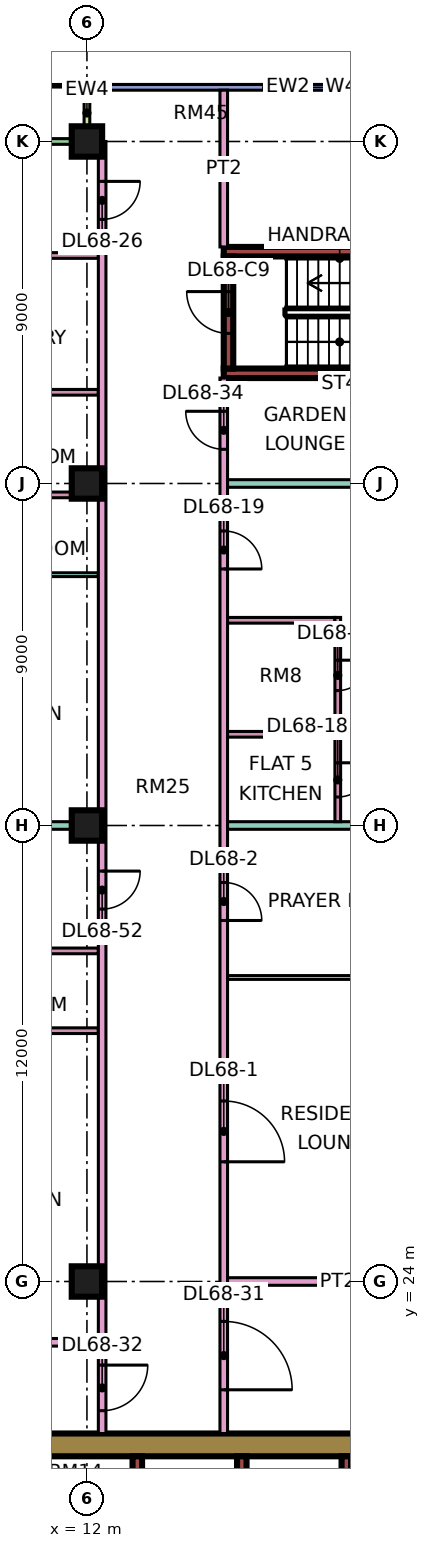
"""IFC4 building model, lengths in metres.
Left out: names, types, materials, properties, quantities, classifications, styles, units other than length and angle.
Written with IfcOpenShell. Run it as: python <this file> out.ifc"""

import sys

from ifc_helpers import new_model, si_unit, direction, frame, frame_2d, origin, origin_2d, place, context, subcontext, project, spatial, rectangle, extrude, element, fill, save


model = new_model("IFC4")
c1 = context("Model", 3, precision=1e-05, world=origin(), true_north=direction((0.0, 1.0)))
c2 = subcontext(c1, "Body", "Model", "MODEL_VIEW")
j1 = project(units=[si_unit("LENGTHUNIT", "METRE"), si_unit("PLANEANGLEUNIT", "RADIAN")], contexts=[c1])
p1 = place(None, origin())
s1 = spatial("IfcSite", under=j1, at=p1, CompositionType="ELEMENT")
p2 = place(p1, origin())
s2 = spatial("IfcBuilding", under=s1, at=p2, CompositionType="ELEMENT")
p3 = place(p2, frame((0.0, 0.0, 292.15)))
s3 = spatial("IfcBuildingStorey", under=s2, at=p3, CompositionType="ELEMENT", Elevation=292.15)
for number, where, z_axis, x_axis in (
    (1, (12.0, 24.0, 0.0), (0.0, 0.0, 1.0), (1.0, 0.0, 0.0)),
    (2, (12.0, 36.0, 0.0), (0.0, 0.0, 1.0), (1.0, 0.0, 0.0)),
    (3, (12.0, 45.0, 0.0), (0.0, 0.0, 1.0), (1.0, 0.0, 0.0)),
    (4, (12.0, 54.0, 0.0), (0.0, 0.0, 1.0), (1.0, 0.0, 0.0)),
):
    element("IfcColumn", number, at=place(p3, frame(where, z_axis=z_axis, x_axis=x_axis)), inside=s3, PredefinedType="COLUMN", context=c2, shape_type="SweptSolid", body=[
        extrude(rectangle(XDim=0.8, YDim=0.8, at=origin_2d()), origin(), (0.0, 0.0, 1.0), 3.75),
    ])
p4 = place(p3, frame((9.0, 19.7, 0.0), z_axis=(0.0, 0.0, 1.0), x_axis=(1.0, 0.0, 0.0)))
e5 = element("IfcWall", 5, at=p4, inside=s3, PredefinedType="SHEAR", context=c2, shape_type="SweptSolid", body=[
    extrude(rectangle(XDim=25.0, YDim=0.6, at=frame_2d((12.5, 0.0))), origin(), (0.0, 0.0, 1.0), 3.75),
])
p5 = place(p4, frame((19.1, 0.0, 0.0)))
e6 = element("IfcOpeningElement", 6, at=p5, cuts=e5, PredefinedType="OPENING", context=c2, shape_type="SweptSolid", body=[
    extrude(rectangle(XDim=1.8, YDim=2.4, at=frame_2d((0.9, 1.2))), frame((0.0, 0.31, 0.0), z_axis=(0.0, -1.0, 0.0), x_axis=(1.0, 0.0, 0.0)), (0.0, 0.0, 1.0), 0.62),
])
p6 = place(p3, frame((13.325, 7.6, 0.0), z_axis=(0.0, 0.0, 1.0), x_axis=(0.0, 1.0, 0.0)))
e7 = element("IfcWall", 7, at=p6, inside=s3, PredefinedType="SHEAR", context=c2, shape_type="SweptSolid", body=[
    extrude(rectangle(XDim=11.8, YDim=0.25, at=frame_2d((5.9, 0.0))), origin(), (0.0, 0.0, 1.0), 3.75),
])
for number, where, z_axis, x_axis in (
    (8, (16.075, 15.8, 0.0), (0.0, 0.0, 1.0), (0.0, 1.0, 0.0)),
    (9, (18.825, 15.8, 0.0), (0.0, 0.0, 1.0), (0.0, 1.0, 0.0)),
):
    element("IfcWall", number, at=place(p3, frame(where, z_axis=z_axis, x_axis=x_axis)), inside=s3, PredefinedType="SHEAR", context=c2, shape_type="SweptSolid", body=[
        extrude(rectangle(XDim=3.6, YDim=0.25, at=frame_2d((1.8, 0.0))), origin(), (0.0, 0.0, 1.0), 3.75),
    ])
for number, where, z_axis, x_axis in (
    (10, (15.6, 47.9, 0.0), (0.0, 0.0, 1.0), (1.0, 0.0, 0.0)),
    (11, (15.6, 51.1, 0.0), (0.0, 0.0, 1.0), (1.0, 0.0, 0.0)),
):
    element("IfcWall", number, at=place(p3, frame(where, z_axis=z_axis, x_axis=x_axis)), inside=s3, PredefinedType="SHEAR", context=c2, shape_type="SweptSolid", body=[
        extrude(rectangle(XDim=7.0, YDim=0.25, at=frame_2d((3.5, 0.0))), origin(), (0.0, 0.0, 1.0), 3.75),
    ])
p7 = place(p3, frame((15.725, 48.025, 0.0), z_axis=(0.0, 0.0, 1.0), x_axis=(0.0, 1.0, 0.0)))
e12 = element("IfcWall", 12, at=p7, inside=s3, PredefinedType="SHEAR", context=c2, shape_type="SweptSolid", body=[
    extrude(rectangle(XDim=2.95, YDim=0.25, at=frame_2d((1.475, 0.0))), origin(), (0.0, 0.0, 1.0), 3.75),
])
p8 = place(p7, frame((0.925, 0.0, 0.0)))
e13 = element("IfcOpeningElement", 13, at=p8, cuts=e12, PredefinedType="OPENING", context=c2, shape_type="SweptSolid", body=[
    extrude(rectangle(XDim=1.1, YDim=2.2, at=frame_2d((0.55, 1.1))), frame((0.0, 0.135, 0.0), z_axis=(0.0, -1.0, 0.0), x_axis=(1.0, 0.0, 0.0)), (0.0, 0.0, 1.0), 0.27),
])
p9 = place(p3, frame((22.5, 55.425, 0.0), z_axis=(0.0, 0.0, 1.0), x_axis=(-1.0, 0.0, 0.0)))
e14 = element("IfcWall", 14, at=p9, inside=s3, PredefinedType="SOLIDWALL", context=c2, shape_type="SweptSolid", body=[
    extrude(rectangle(XDim=10.425, YDim=0.15, at=frame_2d((5.212, 0.0))), origin(), (0.0, 0.0, 1.0), 3.35),
])
p10 = place(p9, frame((1.05, 0.0, 0.45)))
e15 = element("IfcOpeningElement", 15, at=p10, cuts=e14, PredefinedType="OPENING", context=c2, shape_type="SweptSolid", body=[
    extrude(rectangle(XDim=4.8, YDim=2.4, at=frame_2d((2.4, 1.2))), frame((0.0, 0.085, 0.0), z_axis=(0.0, -1.0, 0.0), x_axis=(1.0, 0.0, 0.0)), (0.0, 0.0, 1.0), 0.17),
])
p11 = place(p3, frame((11.925, 54.0, 0.0), z_axis=(0.0, 0.0, 1.0), x_axis=(-1.0, 0.0, 0.0)))
e16 = element("IfcWall", 16, at=p11, inside=s3, PredefinedType="SOLIDWALL", context=c2, shape_type="SweptSolid", body=[
    extrude(rectangle(XDim=10.35, YDim=0.15, at=frame_2d((5.175, 0.0))), origin(), (0.0, 0.0, 1.0), 3.35),
])
p12 = place(p11, frame((4.488, 0.0, 0.0)))
e17 = element("IfcOpeningElement", 17, at=p12, cuts=e16, PredefinedType="OPENING", context=c2, shape_type="SweptSolid", body=[
    extrude(rectangle(XDim=1.8, YDim=2.4, at=frame_2d((0.9, 1.2))), frame((0.0, 0.085, 0.0), z_axis=(0.0, -1.0, 0.0), x_axis=(1.0, 0.0, 0.0)), (0.0, 0.0, 1.0), 0.17),
])
p13 = place(p3, frame((12.0, 55.5, 0.0), z_axis=(0.0, 0.0, 1.0), x_axis=(0.0, -1.0, 0.0)))
e18 = element("IfcWall", 18, at=p13, inside=s3, PredefinedType="SOLIDWALL", context=c2, shape_type="SweptSolid", body=[
    extrude(rectangle(XDim=1.5, YDim=0.15, at=frame_2d((0.75, 0.0))), origin(), (0.0, 0.0, 1.0), 3.35),
])
p14 = place(p3, frame((-1.35, 22.4, 0.0), z_axis=(0.0, 0.0, 1.0), x_axis=(1.0, 0.0, 0.0)))
e19 = element("IfcWall", 19, at=p14, inside=s3, PredefinedType="PARTITIONING", context=c2, shape_type="SweptSolid", body=[
    extrude(rectangle(XDim=13.65, YDim=0.2, at=frame_2d((6.825, 0.0))), origin(), (0.0, 0.0, 1.0), 3.35),
])
p15 = place(p3, frame((0.0, 36.0, 0.0), z_axis=(0.0, 0.0, 1.0), x_axis=(1.0, 0.0, 0.0)))
e20 = element("IfcWall", 20, at=p15, inside=s3, PredefinedType="PARTITIONING", context=c2, shape_type="SweptSolid", body=[
    extrude(rectangle(XDim=12.3, YDim=0.2, at=frame_2d((6.15, 0.0))), origin(), (0.0, 0.0, 1.0), 3.35),
])
for number, where, z_axis, x_axis in (
    (21, (7.675, 30.6, 0.0), (0.0, 0.0, 1.0), (1.0, 0.0, 0.0)),
    (22, (7.675, 32.7, 0.0), (0.0, 0.0, 1.0), (1.0, 0.0, 0.0)),
):
    element("IfcWall", number, at=place(p3, frame(where, z_axis=z_axis, x_axis=x_axis)), inside=s3, PredefinedType="PARTITIONING", context=c2, shape_type="SweptSolid", body=[
        extrude(rectangle(XDim=4.625, YDim=0.15, at=frame_2d((2.312, 0.0))), origin(), (0.0, 0.0, 1.0), 3.35),
    ])
p16 = place(p3, frame((7.675, 42.6, 0.0), z_axis=(0.0, 0.0, 1.0), x_axis=(1.0, 0.0, 0.0)))
e23 = element("IfcWall", 23, at=p16, inside=s3, PredefinedType="PARTITIONING", context=c2, shape_type="SweptSolid", body=[
    extrude(rectangle(XDim=4.625, YDim=0.1, at=frame_2d((2.312, 0.0))), origin(), (0.0, 0.0, 1.0), 3.35),
])
for number, where, z_axis, x_axis in (
    (24, (7.675, 44.7, 0.0), (0.0, 0.0, 1.0), (1.0, 0.0, 0.0)),
    (25, (7.675, 47.4, 0.0), (0.0, 0.0, 1.0), (1.0, 0.0, 0.0)),
):
    element("IfcWall", number, at=place(p3, frame(where, z_axis=z_axis, x_axis=x_axis)), inside=s3, PredefinedType="PARTITIONING", context=c2, shape_type="SweptSolid", body=[
        extrude(rectangle(XDim=4.625, YDim=0.15, at=frame_2d((2.312, 0.0))), origin(), (0.0, 0.0, 1.0), 3.35),
    ])
p17 = place(p3, frame((7.675, 51.0, 0.0), z_axis=(0.0, 0.0, 1.0), x_axis=(1.0, 0.0, 0.0)))
e26 = element("IfcWall", 26, at=p17, inside=s3, PredefinedType="PARTITIONING", context=c2, shape_type="SweptSolid", body=[
    extrude(rectangle(XDim=4.625, YDim=0.15, at=frame_2d((2.312, 0.0))), origin(), (0.0, 0.0, 1.0), 3.35),
])
p18 = place(p17, frame((1.875, 0.0, 0.0)))
e27 = element("IfcOpeningElement", 27, at=p18, cuts=e26, PredefinedType="OPENING", context=c2, shape_type="SweptSolid", body=[
    extrude(rectangle(XDim=0.8, YDim=2.1, at=frame_2d((0.4, 1.05))), frame((0.0, 0.085, 0.0), z_axis=(0.0, -1.0, 0.0), x_axis=(1.0, 0.0, 0.0)), (0.0, 0.0, 1.0), 0.17),
])
p19 = place(p3, frame((12.4, 20.0, 0.0), z_axis=(0.0, 0.0, 1.0), x_axis=(0.0, 1.0, 0.0)))
e28 = element("IfcWall", 28, at=p19, inside=s3, PredefinedType="PARTITIONING", context=c2, shape_type="SweptSolid", body=[
    extrude(rectangle(XDim=34.0, YDim=0.2, at=frame_2d((17.0, 0.0))), origin(), (0.0, 0.0, 1.0), 3.35),
])
p20 = place(p19, frame((31.95, 0.0, 0.0)))
e29 = element("IfcOpeningElement", 29, at=p20, cuts=e28, PredefinedType="OPENING", context=c2, shape_type="SweptSolid", body=[
    extrude(rectangle(XDim=1.0, YDim=2.1, at=frame_2d((0.5, 1.05))), frame((0.0, 0.11, 0.0), z_axis=(0.0, -1.0, 0.0), x_axis=(1.0, 0.0, 0.0)), (0.0, 0.0, 1.0), 0.22),
])
p21 = place(p19, frame((0.6, 0.0, 0.0)))
e30 = element("IfcOpeningElement", 30, at=p21, cuts=e28, PredefinedType="OPENING", context=c2, shape_type="SweptSolid", body=[
    extrude(rectangle(XDim=1.2, YDim=2.1, at=frame_2d((0.6, 1.05))), frame((0.0, 0.11, 0.0), z_axis=(0.0, -1.0, 0.0), x_axis=(1.0, 0.0, 0.0)), (0.0, 0.0, 1.0), 0.22),
])
p22 = place(p19, frame((13.8, 0.0, 0.0)))
e31 = element("IfcOpeningElement", 31, at=p22, cuts=e28, PredefinedType="OPENING", context=c2, shape_type="SweptSolid", body=[
    extrude(rectangle(XDim=1.0, YDim=2.1, at=frame_2d((0.5, 1.05))), frame((0.0, 0.11, 0.0), z_axis=(0.0, -1.0, 0.0), x_axis=(1.0, 0.0, 0.0)), (0.0, 0.0, 1.0), 0.22),
])
p23 = place(p3, frame((15.6, 20.0, 0.0), z_axis=(0.0, 0.0, 1.0), x_axis=(0.0, 1.0, 0.0)))
e32 = element("IfcWall", 32, at=p23, inside=s3, PredefinedType="PARTITIONING", context=c2, shape_type="SweptSolid", body=[
    extrude(rectangle(XDim=27.775, YDim=0.2, at=frame_2d((13.887, 0.0))), origin(), (0.0, 0.0, 1.0), 3.35),
])
p24 = place(p23, frame((7.15, 0.0, 0.0)))
e33 = element("IfcOpeningElement", 33, at=p24, cuts=e32, PredefinedType="OPENING", context=c2, shape_type="SweptSolid", body=[
    extrude(rectangle(XDim=1.6, YDim=2.1, at=frame_2d((0.8, 1.05))), frame((0.0, 0.11, 0.0), z_axis=(0.0, -1.0, 0.0), x_axis=(1.0, 0.0, 0.0)), (0.0, 0.0, 1.0), 0.22),
])
p25 = place(p23, frame((13.5, 0.0, 0.0)))
e34 = element("IfcOpeningElement", 34, at=p25, cuts=e32, PredefinedType="OPENING", context=c2, shape_type="SweptSolid", body=[
    extrude(rectangle(XDim=1.0, YDim=2.1, at=frame_2d((0.5, 1.05))), frame((0.0, 0.11, 0.0), z_axis=(0.0, -1.0, 0.0), x_axis=(1.0, 0.0, 0.0)), (0.0, 0.0, 1.0), 0.22),
])
p26 = place(p23, frame((22.75, 0.0, 0.0)))
e35 = element("IfcOpeningElement", 35, at=p26, cuts=e32, PredefinedType="OPENING", context=c2, shape_type="SweptSolid", body=[
    extrude(rectangle(XDim=1.0, YDim=2.1, at=frame_2d((0.5, 1.05))), frame((0.0, 0.11, 0.0), z_axis=(0.0, -1.0, 0.0), x_axis=(1.0, 0.0, 0.0)), (0.0, 0.0, 1.0), 0.22),
])
p27 = place(p23, frame((1.15, 0.0, 0.0)))
e36 = element("IfcOpeningElement", 36, at=p27, cuts=e32, PredefinedType="OPENING", context=c2, shape_type="SweptSolid", body=[
    extrude(rectangle(XDim=1.8, YDim=2.1, at=frame_2d((0.9, 1.05))), frame((0.0, 0.11, 0.0), z_axis=(0.0, -1.0, 0.0), x_axis=(1.0, 0.0, 0.0)), (0.0, 0.0, 1.0), 0.22),
])
p28 = place(p23, frame((25.9, 0.0, 0.0)))
e37 = element("IfcOpeningElement", 37, at=p28, cuts=e32, PredefinedType="OPENING", context=c2, shape_type="SweptSolid", body=[
    extrude(rectangle(XDim=1.0, YDim=2.1, at=frame_2d((0.5, 1.05))), frame((0.0, 0.11, 0.0), z_axis=(0.0, -1.0, 0.0), x_axis=(1.0, 0.0, 0.0)), (0.0, 0.0, 1.0), 0.22),
])
p29 = place(p3, frame((15.6, 51.225, 0.0), z_axis=(0.0, 0.0, 1.0), x_axis=(0.0, 1.0, 0.0)))
e38 = element("IfcWall", 38, at=p29, inside=s3, PredefinedType="PARTITIONING", context=c2, shape_type="SweptSolid", body=[
    extrude(rectangle(XDim=4.125, YDim=0.2, at=frame_2d((2.062, 0.0))), origin(), (0.0, 0.0, 1.0), 3.35),
])
p30 = place(p3, frame((15.7, 24.0, 0.0), z_axis=(0.0, 0.0, 1.0), x_axis=(1.0, 0.0, 0.0)))
e39 = element("IfcWall", 39, at=p30, inside=s3, PredefinedType="PARTITIONING", context=c2, shape_type="SweptSolid", body=[
    extrude(rectangle(XDim=5.8, YDim=0.2, at=frame_2d((2.9, 0.0))), origin(), (0.0, 0.0, 1.0), 3.35),
])
p31 = place(p3, frame((15.7, 32.0, 0.0), z_axis=(0.0, 0.0, 1.0), x_axis=(1.0, 0.0, 0.0)))
e40 = element("IfcWall", 40, at=p31, inside=s3, PredefinedType="PARTITIONING", context=c2, shape_type="SweptSolid", body=[
    extrude(rectangle(XDim=5.8, YDim=0.1, at=frame_2d((2.9, 0.0))), origin(), (0.0, 0.0, 1.0), 3.35),
])
p32 = place(p3, frame((15.7, 36.0, 0.0), z_axis=(0.0, 0.0, 1.0), x_axis=(1.0, 0.0, 0.0)))
e41 = element("IfcWall", 41, at=p32, inside=s3, PredefinedType="PARTITIONING", context=c2, shape_type="SweptSolid", body=[
    extrude(rectangle(XDim=8.3, YDim=0.2, at=frame_2d((4.15, 0.0))), origin(), (0.0, 0.0, 1.0), 3.35),
])
for number, where, z_axis, x_axis in (
    (42, (15.7, 38.4, 0.0), (0.0, 0.0, 1.0), (1.0, 0.0, 0.0)),
    (43, (15.7, 41.4, 0.0), (0.0, 0.0, 1.0), (1.0, 0.0, 0.0)),
):
    element("IfcWall", number, at=place(p3, frame(where, z_axis=z_axis, x_axis=x_axis)), inside=s3, PredefinedType="PARTITIONING", context=c2, shape_type="SweptSolid", body=[
        extrude(rectangle(XDim=2.825, YDim=0.15, at=frame_2d((1.413, 0.0))), origin(), (0.0, 0.0, 1.0), 3.35),
    ])
p33 = place(p3, frame((15.7, 45.0, 0.0), z_axis=(0.0, 0.0, 1.0), x_axis=(1.0, 0.0, 0.0)))
e44 = element("IfcWall", 44, at=p33, inside=s3, PredefinedType="PARTITIONING", context=c2, shape_type="SweptSolid", body=[
    extrude(rectangle(XDim=8.3, YDim=0.2, at=frame_2d((4.15, 0.0))), origin(), (0.0, 0.0, 1.0), 3.35),
])
p34 = place(p3, frame((18.6, 36.1, 0.0), z_axis=(0.0, 0.0, 1.0), x_axis=(0.0, 1.0, 0.0)))
e45 = element("IfcWall", 45, at=p34, inside=s3, PredefinedType="PARTITIONING", context=c2, shape_type="SweptSolid", body=[
    extrude(rectangle(XDim=5.375, YDim=0.15, at=frame_2d((2.688, 0.0))), origin(), (0.0, 0.0, 1.0), 3.35),
])
p35 = place(p34, frame((3.45, 0.0, 0.0)))
e46 = element("IfcOpeningElement", 46, at=p35, cuts=e45, PredefinedType="OPENING", context=c2, shape_type="SweptSolid", body=[
    extrude(rectangle(XDim=0.8, YDim=2.1, at=frame_2d((0.4, 1.05))), frame((0.0, 0.085, 0.0), z_axis=(0.0, -1.0, 0.0), x_axis=(1.0, 0.0, 0.0)), (0.0, 0.0, 1.0), 0.17),
])
p36 = place(p34, frame((0.65, 0.0, 0.0)))
e47 = element("IfcOpeningElement", 47, at=p36, cuts=e45, PredefinedType="OPENING", context=c2, shape_type="SweptSolid", body=[
    extrude(rectangle(XDim=0.9, YDim=2.1, at=frame_2d((0.45, 1.05))), frame((0.0, 0.085, 0.0), z_axis=(0.0, -1.0, 0.0), x_axis=(1.0, 0.0, 0.0)), (0.0, 0.0, 1.0), 0.17),
])
p37 = place(p10, origin())
e48 = element("IfcWindow", 48, at=p37, inside=s3, PartitioningType="SINGLE_PANEL", PredefinedType="WINDOW", context=c2, shape_type="SweptSolid", body=[
    extrude(rectangle(XDim=4.8, YDim=2.4, at=frame_2d((2.4, 1.2))), frame((0.0, 0.03, 0.0), z_axis=(0.0, -1.0, 0.0), x_axis=(1.0, 0.0, 0.0)), (0.0, 0.0, 1.0), 0.06),
])
fill(e15, e48)
p38 = place(p8, frame((1.1, 0.0, 0.0), z_axis=(0.0, 0.0, 1.0), x_axis=(-1.0, 0.0, 0.0)))
e49 = element("IfcDoor", 49, at=p38, inside=s3, OperationType="SINGLE_SWING_RIGHT", PredefinedType="DOOR", context=c2, shape_type="SweptSolid", body=[
    extrude(rectangle(XDim=1.1, YDim=2.2, at=frame_2d((0.55, 1.1))), frame((0.0, 0.025, 0.0), z_axis=(0.0, -1.0, 0.0), x_axis=(1.0, 0.0, 0.0)), (0.0, 0.0, 1.0), 0.05),
])
fill(e13, e49)
p39 = place(p24, frame((1.6, 0.0, 0.0), z_axis=(0.0, 0.0, 1.0), x_axis=(-1.0, 0.0, 0.0)))
e50 = element("IfcDoor", 50, at=p39, inside=s3, OperationType="DOUBLE_DOOR_SINGLE_SWING", PredefinedType="DOOR", context=c2, shape_type="SweptSolid", body=[
    extrude(rectangle(XDim=1.6, YDim=2.1, at=frame_2d((0.8, 1.05))), frame((0.0, 0.025, 0.0), z_axis=(0.0, -1.0, 0.0), x_axis=(1.0, 0.0, 0.0)), (0.0, 0.0, 1.0), 0.05),
])
fill(e33, e50)
p40 = place(p25, frame((1.0, 0.0, 0.0), z_axis=(0.0, 0.0, 1.0), x_axis=(-1.0, 0.0, 0.0)))
e51 = element("IfcDoor", 51, at=p40, inside=s3, OperationType="SINGLE_SWING_LEFT", PredefinedType="DOOR", context=c2, shape_type="SweptSolid", body=[
    extrude(rectangle(XDim=1.0, YDim=2.1, at=frame_2d((0.5, 1.05))), frame((0.0, 0.025, 0.0), z_axis=(0.0, -1.0, 0.0), x_axis=(1.0, 0.0, 0.0)), (0.0, 0.0, 1.0), 0.05),
])
fill(e34, e51)
p41 = place(p35, origin())
e52 = element("IfcDoor", 52, at=p41, inside=s3, OperationType="SINGLE_SWING_RIGHT", PredefinedType="DOOR", context=c2, shape_type="SweptSolid", body=[
    extrude(rectangle(XDim=0.8, YDim=2.1, at=frame_2d((0.4, 1.05))), frame((0.0, 0.025, 0.0), z_axis=(0.0, -1.0, 0.0), x_axis=(1.0, 0.0, 0.0)), (0.0, 0.0, 1.0), 0.05),
])
fill(e46, e52)
p42 = place(p36, origin())
e53 = element("IfcDoor", 53, at=p42, inside=s3, OperationType="SINGLE_SWING_RIGHT", PredefinedType="DOOR", context=c2, shape_type="SweptSolid", body=[
    extrude(rectangle(XDim=0.9, YDim=2.1, at=frame_2d((0.45, 1.05))), frame((0.0, 0.025, 0.0), z_axis=(0.0, -1.0, 0.0), x_axis=(1.0, 0.0, 0.0)), (0.0, 0.0, 1.0), 0.05),
])
fill(e47, e53)
p43 = place(p26, frame((1.0, 0.0, 0.0), z_axis=(0.0, 0.0, 1.0), x_axis=(-1.0, 0.0, 0.0)))
e54 = element("IfcDoor", 54, at=p43, inside=s3, OperationType="SINGLE_SWING_LEFT", PredefinedType="DOOR", context=c2, shape_type="SweptSolid", body=[
    extrude(rectangle(XDim=1.0, YDim=2.1, at=frame_2d((0.5, 1.05))), frame((0.0, 0.025, 0.0), z_axis=(0.0, -1.0, 0.0), x_axis=(1.0, 0.0, 0.0)), (0.0, 0.0, 1.0), 0.05),
])
fill(e35, e54)
p44 = place(p20, origin())
e55 = element("IfcDoor", 55, at=p44, inside=s3, OperationType="SINGLE_SWING_RIGHT", PredefinedType="DOOR", context=c2, shape_type="SweptSolid", body=[
    extrude(rectangle(XDim=1.0, YDim=2.1, at=frame_2d((0.5, 1.05))), frame((0.0, 0.025, 0.0), z_axis=(0.0, -1.0, 0.0), x_axis=(1.0, 0.0, 0.0)), (0.0, 0.0, 1.0), 0.05),
])
fill(e29, e55)
p45 = place(p27, frame((1.8, 0.0, 0.0), z_axis=(0.0, 0.0, 1.0), x_axis=(-1.0, 0.0, 0.0)))
e56 = element("IfcDoor", 56, at=p45, inside=s3, OperationType="DOUBLE_DOOR_SINGLE_SWING", PredefinedType="DOOR", context=c2, shape_type="SweptSolid", body=[
    extrude(rectangle(XDim=1.8, YDim=2.1, at=frame_2d((0.9, 1.05))), frame((0.0, 0.025, 0.0), z_axis=(0.0, -1.0, 0.0), x_axis=(1.0, 0.0, 0.0)), (0.0, 0.0, 1.0), 0.05),
])
fill(e36, e56)
p46 = place(p21, origin())
e57 = element("IfcDoor", 57, at=p46, inside=s3, OperationType="SINGLE_SWING_RIGHT", PredefinedType="DOOR", context=c2, shape_type="SweptSolid", body=[
    extrude(rectangle(XDim=1.2, YDim=2.1, at=frame_2d((0.6, 1.05))), frame((0.0, 0.025, 0.0), z_axis=(0.0, -1.0, 0.0), x_axis=(1.0, 0.0, 0.0)), (0.0, 0.0, 1.0), 0.05),
])
fill(e30, e57)
p47 = place(p28, frame((1.0, 0.0, 0.0), z_axis=(0.0, 0.0, 1.0), x_axis=(-1.0, 0.0, 0.0)))
e58 = element("IfcDoor", 58, at=p47, inside=s3, OperationType="SINGLE_SWING_RIGHT", PredefinedType="DOOR", context=c2, shape_type="SweptSolid", body=[
    extrude(rectangle(XDim=1.0, YDim=2.1, at=frame_2d((0.5, 1.05))), frame((0.0, 0.025, 0.0), z_axis=(0.0, -1.0, 0.0), x_axis=(1.0, 0.0, 0.0)), (0.0, 0.0, 1.0), 0.05),
])
fill(e37, e58)
p48 = place(p22, origin())
e59 = element("IfcDoor", 59, at=p48, inside=s3, OperationType="SINGLE_SWING_RIGHT", PredefinedType="DOOR", context=c2, shape_type="SweptSolid", body=[
    extrude(rectangle(XDim=1.0, YDim=2.1, at=frame_2d((0.5, 1.05))), frame((0.0, 0.025, 0.0), z_axis=(0.0, -1.0, 0.0), x_axis=(1.0, 0.0, 0.0)), (0.0, 0.0, 1.0), 0.05),
])
fill(e31, e59)
save(model, sys.argv[1])
